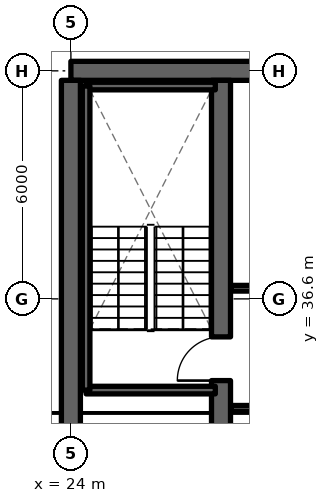
"""IFC4 building model, lengths in metres.
Left out: names, types, materials, properties, quantities, classifications, styles, units other than length and angle.
Written with IfcOpenShell. Run it as: python <this file> out.ifc"""

import sys

from ifc_helpers import new_model, si_unit, direction, frame, frame_2d, origin, place, context, subcontext, project, spatial, rectangle, extrude, element, fill, save


model = new_model("IFC4")
c1 = context("Model", 3, precision=1e-05, world=origin(), true_north=direction((0.0, 1.0)))
c2 = subcontext(c1, "Body", "Model", "MODEL_VIEW")
j1 = project(units=[si_unit("LENGTHUNIT", "METRE"), si_unit("PLANEANGLEUNIT", "RADIAN")], contexts=[c1])
p1 = place(None, origin())
s1 = spatial("IfcSite", under=j1, at=p1, CompositionType="ELEMENT")
p2 = place(p1, origin())
s2 = spatial("IfcBuilding", under=s1, at=p2, CompositionType="ELEMENT")
p3 = place(p2, frame((0.0, 0.0, 155.1)))
s3 = spatial("IfcBuildingStorey", under=s2, at=p3, CompositionType="ELEMENT", Elevation=155.1)
p4 = place(p3, frame((36.0, 42.6, 0.0), z_axis=(0.0, 0.0, 1.0), x_axis=(-1.0, 0.0, 0.0)))
e1 = element("IfcWall", 1, at=p4, inside=s3, PredefinedType="SHEAR", context=c2, shape_type="SweptSolid", body=[
    extrude(rectangle(XDim=12.0, YDim=0.5, at=frame_2d((6.0, 0.0))), origin(), (0.0, 0.0, 1.0), 3.3),
])
p5 = place(p3, frame((24.0, 24.85, 0.0), z_axis=(0.0, 0.0, 1.0), x_axis=(0.0, 1.0, 0.0)))
e2 = element("IfcWall", 2, at=p5, inside=s3, PredefinedType="SHEAR", context=c2, shape_type="SweptSolid", body=[
    extrude(rectangle(XDim=17.5, YDim=0.5, at=frame_2d((8.75, 0.0))), origin(), (0.0, 0.0, 1.0), 3.3),
])
p6 = place(p3, frame((27.95, 24.85, 0.0), z_axis=(0.0, 0.0, 1.0), x_axis=(0.0, 1.0, 0.0)))
e3 = element("IfcWall", 3, at=p6, inside=s3, PredefinedType="SHEAR", context=c2, shape_type="SweptSolid", body=[
    extrude(rectangle(XDim=17.5, YDim=0.5, at=frame_2d((8.75, 0.0))), origin(), (0.0, 0.0, 1.0), 3.3),
])
p7 = place(p6, frame((0.4, 0.0, 0.0)))
e4 = element("IfcOpeningElement", 4, at=p7, cuts=e3, PredefinedType="OPENING", context=c2, shape_type="SweptSolid", body=[
    extrude(rectangle(XDim=1.15, YDim=2.15, at=frame_2d((0.575, 1.075))), frame((0.0, 0.26, 0.0), z_axis=(0.0, -1.0, 0.0), x_axis=(1.0, 0.0, 0.0)), (0.0, 0.0, 1.0), 0.52),
])
p8 = place(p6, frame((9.6, 0.0, 0.0)))
e5 = element("IfcOpeningElement", 5, at=p8, cuts=e3, PredefinedType="OPENING", context=c2, shape_type="SweptSolid", body=[
    extrude(rectangle(XDim=1.15, YDim=2.15, at=frame_2d((0.575, 1.075))), frame((0.0, 0.26, 0.0), z_axis=(0.0, -1.0, 0.0), x_axis=(1.0, 0.0, 0.0)), (0.0, 0.0, 1.0), 0.52),
])
p9 = place(p3, frame((28.22, 33.72, 0.0), z_axis=(0.0, 0.0, 1.0), x_axis=(1.0, 0.0, 0.0)))
e6 = element("IfcWall", 6, at=p9, inside=s3, PredefinedType="SOLIDWALL", context=c2, shape_type="SweptSolid", body=[
    extrude(rectangle(XDim=2.58, YDim=0.15, at=frame_2d((1.29, 0.0))), origin(), (0.0, 0.0, 1.0), 2.35),
])
p10 = place(p3, frame((28.22, 36.88, 0.0), z_axis=(0.0, 0.0, 1.0), x_axis=(1.0, 0.0, 0.0)))
e7 = element("IfcWall", 7, at=p10, inside=s3, PredefinedType="SOLIDWALL", context=c2, shape_type="SweptSolid", body=[
    extrude(rectangle(XDim=4.28, YDim=0.15, at=frame_2d((2.14, 0.0))), origin(), (0.0, 0.0, 1.0), 2.35),
])
p11 = place(p10, frame((1.6, 0.0, 0.0)))
e8 = element("IfcOpeningElement", 8, at=p11, cuts=e7, PredefinedType="OPENING", context=c2, shape_type="SweptSolid", body=[
    extrude(rectangle(XDim=0.95, YDim=2.15, at=frame_2d((0.475, 1.075))), frame((0.0, 0.085, 0.0), z_axis=(0.0, -1.0, 0.0), x_axis=(1.0, 0.0, 0.0)), (0.0, 0.0, 1.0), 0.17),
])
for number, where, z_axis, x_axis in (
    (9, (24.4, 34.2, 0.0), (0.0, 0.0, 1.0), (1.0, 0.0, 0.0)),
    (10, (27.8, 42.2, 0.0), (0.0, 0.0, 1.0), (-1.0, 0.0, 0.0)),
):
    element("IfcWall", number, at=place(p3, frame(where, z_axis=z_axis, x_axis=x_axis)), inside=s3, PredefinedType="SOLIDWALL", context=c2, shape_type="SweptSolid", body=[
        extrude(rectangle(XDim=3.4, YDim=0.2, at=frame_2d((1.7, 0.0))), origin(), (0.0, 0.0, 1.0), 3.3),
    ])
p12 = place(p3, frame((24.4, 42.2, 0.0), z_axis=(0.0, 0.0, 1.0), x_axis=(0.0, -1.0, 0.0)))
e11 = element("IfcWall", 11, at=p12, inside=s3, PredefinedType="SOLIDWALL", context=c2, shape_type="SweptSolid", body=[
    extrude(rectangle(XDim=8.0, YDim=0.2, at=frame_2d((4.0, 0.0))), origin(), (0.0, 0.0, 1.0), 3.3),
])
p13 = place(p8, origin())
e12 = element("IfcDoor", 12, at=p13, inside=s3, OperationType="SINGLE_SWING_LEFT", PredefinedType="DOOR", context=c2, shape_type="SweptSolid", body=[
    extrude(rectangle(XDim=1.15, YDim=2.15, at=frame_2d((0.575, 1.075))), frame((0.0, 0.025, 0.0), z_axis=(0.0, -1.0, 0.0), x_axis=(1.0, 0.0, 0.0)), (0.0, 0.0, 1.0), 0.05),
])
fill(e5, e12)
save(model, sys.argv[1])
